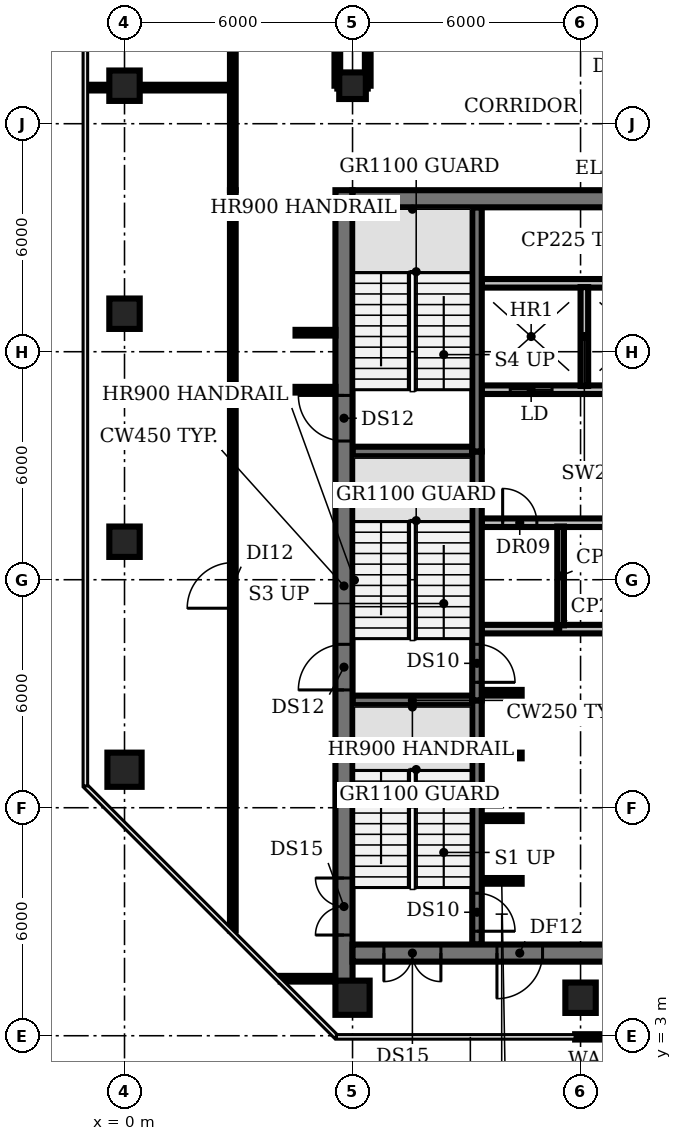
"""IFC4 building model, lengths in metres.
Left out: names, types, materials, properties, quantities, classifications, styles, units other than length and angle.
Written with IfcOpenShell. Run it as: python <this file> out.ifc"""

import sys

from ifc_helpers import new_model, si_unit, direction, frame, frame_2d, origin, origin_2d, place, context, subcontext, project, spatial, rectangle, circle, extrude, element, fill, save


model = new_model("IFC4")
c1 = context("Model", 3, precision=1e-05, world=origin(), true_north=direction((0.0, 1.0)))
c2 = subcontext(c1, "Body", "Model", "MODEL_VIEW")
j1 = project(units=[si_unit("LENGTHUNIT", "METRE"), si_unit("PLANEANGLEUNIT", "RADIAN")], contexts=[c1])
p1 = place(None, origin())
s1 = spatial("IfcSite", under=j1, at=p1, CompositionType="ELEMENT")
p2 = place(p1, origin())
s2 = spatial("IfcBuilding", under=s1, at=p2, CompositionType="ELEMENT")
p3 = place(p2, frame((0.0, 0.0, 213.8)))
s3 = spatial("IfcBuildingStorey", under=s2, at=p3, CompositionType="ELEMENT", Elevation=213.8)
p4 = place(p3, frame((0.0, 10.0, 0.0), z_axis=(0.0, 0.0, 1.0), x_axis=(1.0, 0.0, 0.0)))
e1 = element("IfcColumn", 1, at=p4, inside=s3, PredefinedType="COLUMN", context=c2, shape_type="SweptSolid", body=[
    extrude(circle(Radius=0.45, at=origin_2d()), origin(), (0.0, 0.0, 1.0), 3.85),
])
for number, where, z_axis, x_axis in (
    (2, (0.0, 16.0, 0.0), (0.0, 0.0, 1.0), (1.0, 0.0, 0.0)),
    (3, (0.0, 22.0, 0.0), (0.0, 0.0, 1.0), (1.0, 0.0, 0.0)),
    (4, (0.0, 28.0, 0.0), (0.0, 0.0, 1.0), (1.0, 0.0, 0.0)),
):
    element("IfcColumn", number, at=place(p3, frame(where, z_axis=z_axis, x_axis=x_axis)), inside=s3, PredefinedType="COLUMN", context=c2, shape_type="SweptSolid", body=[
        extrude(rectangle(XDim=0.8, YDim=0.8, at=origin_2d()), origin(), (0.0, 0.0, 1.0), 3.85),
    ])
p5 = place(p3, frame((6.0, 4.0, 0.0), z_axis=(0.0, 0.0, 1.0), x_axis=(1.0, 0.0, 0.0)))
e5 = element("IfcColumn", 5, at=p5, inside=s3, PredefinedType="COLUMN", context=c2, shape_type="SweptSolid", body=[
    extrude(circle(Radius=0.45, at=origin_2d()), origin(), (0.0, 0.0, 1.0), 3.85),
])
p6 = place(p3, frame((6.0, 28.0, 0.0), z_axis=(0.0, 0.0, 1.0), x_axis=(1.0, 0.0, 0.0)))
e6 = element("IfcColumn", 6, at=p6, inside=s3, PredefinedType="COLUMN", context=c2, shape_type="SweptSolid", body=[
    extrude(rectangle(XDim=0.7, YDim=0.7, at=origin_2d()), origin(), (0.0, 0.0, 1.0), 3.85),
])
p7 = place(p3, frame((12.0, 4.0, 0.0), z_axis=(0.0, 0.0, 1.0), x_axis=(1.0, 0.0, 0.0)))
e7 = element("IfcColumn", 7, at=p7, inside=s3, PredefinedType="COLUMN", context=c2, shape_type="SweptSolid", body=[
    extrude(rectangle(XDim=0.8, YDim=0.8, at=origin_2d()), origin(), (0.0, 0.0, 1.0), 3.85),
])
p8 = place(p3, frame((11.858, 2.97, 0.0), z_axis=(0.0, 0.0, 1.0), x_axis=(1.0, 0.0, 0.0)))
e8 = element("IfcWall", 8, at=p8, inside=s3, PredefinedType="SOLIDWALL", context=c2, shape_type="SweptSolid", body=[
    extrude(rectangle(XDim=6.284, YDim=0.14, at=frame_2d((3.142, 0.0))), origin(), (0.0, 0.0, 1.0), 3.85),
])
p9 = place(p8, frame((2.242, 0.0, 0.0)))
e9 = element("IfcOpeningElement", 9, at=p9, cuts=e8, PredefinedType="OPENING", context=c2, shape_type="SweptSolid", body=[
    extrude(rectangle(XDim=1.8, YDim=2.4, at=frame_2d((0.9, 1.2))), frame((0.0, 0.08, 0.0), z_axis=(0.0, -1.0, 0.0), x_axis=(1.0, 0.0, 0.0)), (0.0, 0.0, 1.0), 0.16),
])
for number, where, z_axis, x_axis in (
    (10, (9.4, 7.075, 0.0), (0.0, 0.0, 1.0), (1.0, 0.0, 0.0)),
    (11, (9.4, 8.725, 0.0), (0.0, 0.0, 1.0), (1.0, 0.0, 0.0)),
    (12, (9.4, 10.375, 0.0), (0.0, 0.0, 1.0), (1.0, 0.0, 0.0)),
):
    element("IfcWall", number, at=place(p3, frame(where, z_axis=z_axis, x_axis=x_axis)), inside=s3, PredefinedType="SHEAR", context=c2, shape_type="SweptSolid", body=[
        extrude(rectangle(XDim=1.05, YDim=0.15, at=frame_2d((0.525, 0.0))), origin(), (0.0, 0.0, 1.0), 3.85),
    ])
p10 = place(p3, frame((6.0, 11.825, 0.0), z_axis=(0.0, 0.0, 1.0), x_axis=(1.0, 0.0, 0.0)))
e13 = element("IfcWall", 13, at=p10, inside=s3, PredefinedType="SHEAR", context=c2, shape_type="SweptSolid", body=[
    extrude(rectangle(XDim=3.15, YDim=0.25, at=frame_2d((1.575, 0.0))), origin(), (0.0, 0.0, 1.0), 3.85),
])
p11 = place(p3, frame((9.4, 12.025, 0.0), z_axis=(0.0, 0.0, 1.0), x_axis=(1.0, 0.0, 0.0)))
e14 = element("IfcWall", 14, at=p11, inside=s3, PredefinedType="SHEAR", context=c2, shape_type="SweptSolid", body=[
    extrude(rectangle(XDim=1.05, YDim=0.15, at=frame_2d((0.525, 0.0))), origin(), (0.0, 0.0, 1.0), 3.85),
])
p12 = place(p3, frame((9.4, 13.7, 0.0), z_axis=(0.0, 0.0, 1.0), x_axis=(1.0, 0.0, 0.0)))
e15 = element("IfcWall", 15, at=p12, inside=s3, PredefinedType="PARTITIONING", context=c2, shape_type="SweptSolid", body=[
    extrude(rectangle(XDim=4.0, YDim=0.225, at=frame_2d((2.0, 0.0))), origin(), (0.0, 0.0, 1.0), 3.85),
])
p13 = place(p3, frame((9.4, 16.5, 0.0), z_axis=(0.0, 0.0, 1.0), x_axis=(1.0, 0.0, 0.0)))
e16 = element("IfcWall", 16, at=p13, inside=s3, PredefinedType="PARTITIONING", context=c2, shape_type="SweptSolid", body=[
    extrude(rectangle(XDim=14.6, YDim=0.225, at=frame_2d((7.3, 0.0))), origin(), (0.0, 0.0, 1.0), 3.85),
])
p14 = place(p13, frame((0.55, 0.0, 0.0)))
e17 = element("IfcOpeningElement", 17, at=p14, cuts=e16, PredefinedType="OPENING", context=c2, shape_type="SweptSolid", body=[
    extrude(rectangle(XDim=0.9, YDim=2.1, at=frame_2d((0.45, 1.05))), frame((0.0, 0.123, 0.0), z_axis=(0.0, -1.0, 0.0), x_axis=(1.0, 0.0, 0.0)), (0.0, 0.0, 1.0), 0.245),
])
p15 = place(p13, frame((6.075, 0.0, 0.0)))
e18 = element("IfcOpeningElement", 18, at=p15, cuts=e16, PredefinedType="OPENING", context=c2, shape_type="SweptSolid", body=[
    extrude(rectangle(XDim=1.0, YDim=2.1, at=frame_2d((0.5, 1.05))), frame((0.0, 0.123, 0.0), z_axis=(0.0, -1.0, 0.0), x_axis=(1.0, 0.0, 0.0)), (0.0, 0.0, 1.0), 0.245),
])
p16 = place(p13, frame((11.308, 0.0, 0.0)))
e19 = element("IfcOpeningElement", 19, at=p16, cuts=e16, PredefinedType="OPENING", context=c2, shape_type="SweptSolid", body=[
    extrude(rectangle(XDim=0.9, YDim=2.1, at=frame_2d((0.45, 1.05))), frame((0.0, 0.123, 0.0), z_axis=(0.0, -1.0, 0.0), x_axis=(1.0, 0.0, 0.0)), (0.0, 0.0, 1.0), 0.245),
])
p17 = place(p13, frame((13.083, 0.0, 0.0)))
e20 = element("IfcOpeningElement", 20, at=p17, cuts=e16, PredefinedType="OPENING", context=c2, shape_type="SweptSolid", body=[
    extrude(rectangle(XDim=0.9, YDim=2.1, at=frame_2d((0.45, 1.05))), frame((0.0, 0.123, 0.0), z_axis=(0.0, -1.0, 0.0), x_axis=(1.0, 0.0, 0.0)), (0.0, 0.0, 1.0), 0.245),
])
p18 = place(p3, frame((6.0, 18.375, 0.0), z_axis=(0.0, 0.0, 1.0), x_axis=(1.0, 0.0, 0.0)))
e21 = element("IfcWall", 21, at=p18, inside=s3, PredefinedType="SHEAR", context=c2, shape_type="SweptSolid", body=[
    extrude(rectangle(XDim=3.15, YDim=0.25, at=frame_2d((1.575, 0.0))), origin(), (0.0, 0.0, 1.0), 3.85),
])
p19 = place(p3, frame((24.0, 20.0, 0.0), z_axis=(0.0, 0.0, 1.0), x_axis=(-1.0, 0.0, 0.0)))
e22 = element("IfcWall", 22, at=p19, inside=s3, PredefinedType="PARTITIONING", context=c2, shape_type="SweptSolid", body=[
    extrude(rectangle(XDim=14.6, YDim=0.225, at=frame_2d((7.3, 0.0))), origin(), (0.0, 0.0, 1.0), 3.85),
])
p20 = place(p19, frame((12.75, 0.0, 0.0)))
e23 = element("IfcOpeningElement", 23, at=p20, cuts=e22, PredefinedType="OPENING", context=c2, shape_type="SweptSolid", body=[
    extrude(rectangle(XDim=1.1, YDim=2.1, at=frame_2d((0.55, 1.05))), frame((0.0, 0.123, 0.0), z_axis=(0.0, -1.0, 0.0), x_axis=(1.0, 0.0, 0.0)), (0.0, 0.0, 1.0), 0.245),
])
p21 = place(p19, frame((9.95, 0.0, 0.0)))
e24 = element("IfcOpeningElement", 24, at=p21, cuts=e22, PredefinedType="OPENING", context=c2, shape_type="SweptSolid", body=[
    extrude(rectangle(XDim=1.1, YDim=2.1, at=frame_2d((0.55, 1.05))), frame((0.0, 0.123, 0.0), z_axis=(0.0, -1.0, 0.0), x_axis=(1.0, 0.0, 0.0)), (0.0, 0.0, 1.0), 0.245),
])
p22 = place(p19, frame((7.15, 0.0, 0.0)))
e25 = element("IfcOpeningElement", 25, at=p22, cuts=e22, PredefinedType="OPENING", context=c2, shape_type="SweptSolid", body=[
    extrude(rectangle(XDim=1.1, YDim=2.1, at=frame_2d((0.55, 1.05))), frame((0.0, 0.123, 0.0), z_axis=(0.0, -1.0, 0.0), x_axis=(1.0, 0.0, 0.0)), (0.0, 0.0, 1.0), 0.245),
])
p23 = place(p19, frame((4.35, 0.0, 0.0)))
e26 = element("IfcOpeningElement", 26, at=p23, cuts=e22, PredefinedType="OPENING", context=c2, shape_type="SweptSolid", body=[
    extrude(rectangle(XDim=1.1, YDim=2.1, at=frame_2d((0.55, 1.05))), frame((0.0, 0.123, 0.0), z_axis=(0.0, -1.0, 0.0), x_axis=(1.0, 0.0, 0.0)), (0.0, 0.0, 1.0), 0.245),
])
p24 = place(p19, frame((2.308, 0.0, 0.0)))
e27 = element("IfcOpeningElement", 27, at=p24, cuts=e22, PredefinedType="OPENING", context=c2, shape_type="SweptSolid", body=[
    extrude(rectangle(XDim=0.9, YDim=2.1, at=frame_2d((0.45, 1.05))), frame((0.0, 0.123, 0.0), z_axis=(0.0, -1.0, 0.0), x_axis=(1.0, 0.0, 0.0)), (0.0, 0.0, 1.0), 0.245),
])
p25 = place(p19, frame((0.532, 0.0, 0.0)))
e28 = element("IfcOpeningElement", 28, at=p25, cuts=e22, PredefinedType="OPENING", context=c2, shape_type="SweptSolid", body=[
    extrude(rectangle(XDim=0.9, YDim=2.1, at=frame_2d((0.45, 1.05))), frame((0.0, 0.123, 0.0), z_axis=(0.0, -1.0, 0.0), x_axis=(1.0, 0.0, 0.0)), (0.0, 0.0, 1.0), 0.245),
])
p26 = place(p3, frame((9.4, 22.8, 0.0), z_axis=(0.0, 0.0, 1.0), x_axis=(1.0, 0.0, 0.0)))
e29 = element("IfcWall", 29, at=p26, inside=s3, PredefinedType="PARTITIONING", context=c2, shape_type="SweptSolid", body=[
    extrude(rectangle(XDim=14.6, YDim=0.225, at=frame_2d((7.3, 0.0))), origin(), (0.0, 0.0, 1.0), 3.85),
])
p27 = place(p3, frame((9.275, 11.825, 0.0), z_axis=(0.0, 0.0, 1.0), x_axis=(0.0, -1.0, 0.0)))
e30 = element("IfcWall", 30, at=p27, inside=s3, PredefinedType="SHEAR", context=c2, shape_type="SweptSolid", body=[
    extrude(rectangle(XDim=6.425, YDim=0.25, at=frame_2d((3.212, 0.0))), origin(), (0.0, 0.0, 1.0), 3.85),
])
p28 = place(p27, frame((5.075, 0.0, 0.0)))
e31 = element("IfcOpeningElement", 31, at=p28, cuts=e30, PredefinedType="OPENING", context=c2, shape_type="SweptSolid", body=[
    extrude(rectangle(XDim=1.0, YDim=2.1, at=frame_2d((0.5, 1.05))), frame((0.0, 0.135, 0.0), z_axis=(0.0, -1.0, 0.0), x_axis=(1.0, 0.0, 0.0)), (0.0, 0.0, 1.0), 0.27),
])
p29 = place(p3, frame((9.275, 18.375, 0.0), z_axis=(0.0, 0.0, 1.0), x_axis=(0.0, -1.0, 0.0)))
e32 = element("IfcWall", 32, at=p29, inside=s3, PredefinedType="SHEAR", context=c2, shape_type="SweptSolid", body=[
    extrude(rectangle(XDim=6.55, YDim=0.25, at=frame_2d((3.275, 0.0))), origin(), (0.0, 0.0, 1.0), 3.85),
])
p30 = place(p29, frame((5.075, 0.0, 0.0)))
e33 = element("IfcOpeningElement", 33, at=p30, cuts=e32, PredefinedType="OPENING", context=c2, shape_type="SweptSolid", body=[
    extrude(rectangle(XDim=1.0, YDim=2.1, at=frame_2d((0.5, 1.05))), frame((0.0, 0.135, 0.0), z_axis=(0.0, -1.0, 0.0), x_axis=(1.0, 0.0, 0.0)), (0.0, 0.0, 1.0), 0.27),
])
p31 = place(p3, frame((9.275, 18.375, 0.0), z_axis=(0.0, 0.0, 1.0), x_axis=(0.0, 1.0, 0.0)))
e34 = element("IfcWall", 34, at=p31, inside=s3, PredefinedType="SHEAR", context=c2, shape_type="SweptSolid", body=[
    extrude(rectangle(XDim=6.425, YDim=0.25, at=frame_2d((3.212, 0.0))), origin(), (0.0, 0.0, 1.0), 3.85),
])
p32 = place(p3, frame((11.475, 13.8, 0.0), z_axis=(0.0, 0.0, 1.0), x_axis=(0.0, 1.0, 0.0)))
e35 = element("IfcWall", 35, at=p32, inside=s3, PredefinedType="PARTITIONING", context=c2, shape_type="SweptSolid", body=[
    extrude(rectangle(XDim=2.6, YDim=0.175, at=frame_2d((1.3, 0.0))), origin(), (0.0, 0.0, 1.0), 3.85),
])
p33 = place(p3, frame((12.1, 20.1, 0.0), z_axis=(0.0, 0.0, 1.0), x_axis=(0.0, 1.0, 0.0)))
e36 = element("IfcWall", 36, at=p33, inside=s3, PredefinedType="SOLIDWALL", context=c2, shape_type="SweptSolid", body=[
    extrude(rectangle(XDim=2.6, YDim=0.2, at=frame_2d((1.3, 0.0))), origin(), (0.0, 0.0, 1.0), 3.85),
])
p34 = place(p3, frame((5.775, 4.42, 0.0), z_axis=(0.0, 0.0, 1.0), x_axis=(0.0, 1.0, 0.0)))
e37 = element("IfcWall", 37, at=p34, inside=s3, PredefinedType="SHEAR", context=c2, shape_type="SweptSolid", body=[
    extrude(rectangle(XDim=20.83, YDim=0.45, at=frame_2d((10.415, 0.0))), origin(), (0.0, 0.0, 1.0), 3.85),
])
p35 = place(p34, frame((1.23, 0.0, 0.0)))
e38 = element("IfcOpeningElement", 38, at=p35, cuts=e37, PredefinedType="OPENING", context=c2, shape_type="SweptSolid", body=[
    extrude(rectangle(XDim=1.5, YDim=2.1, at=frame_2d((0.75, 1.05))), frame((0.0, 0.235, 0.0), z_axis=(0.0, -1.0, 0.0), x_axis=(1.0, 0.0, 0.0)), (0.0, 0.0, 1.0), 0.47),
])
p36 = place(p34, frame((7.68, 0.0, 0.0)))
e39 = element("IfcOpeningElement", 39, at=p36, cuts=e37, PredefinedType="OPENING", context=c2, shape_type="SweptSolid", body=[
    extrude(rectangle(XDim=1.2, YDim=2.1, at=frame_2d((0.6, 1.05))), frame((0.0, 0.235, 0.0), z_axis=(0.0, -1.0, 0.0), x_axis=(1.0, 0.0, 0.0)), (0.0, 0.0, 1.0), 0.47),
])
p37 = place(p34, frame((14.23, 0.0, 0.0)))
e40 = element("IfcOpeningElement", 40, at=p37, cuts=e37, PredefinedType="OPENING", context=c2, shape_type="SweptSolid", body=[
    extrude(rectangle(XDim=1.2, YDim=2.1, at=frame_2d((0.6, 1.05))), frame((0.0, 0.235, 0.0), z_axis=(0.0, -1.0, 0.0), x_axis=(1.0, 0.0, 0.0)), (0.0, 0.0, 1.0), 0.47),
])
p38 = place(p3, frame((24.0, 5.175, 0.0), z_axis=(0.0, 0.0, 1.0), x_axis=(-1.0, 0.0, 0.0)))
e41 = element("IfcWall", 41, at=p38, inside=s3, PredefinedType="SHEAR", context=c2, shape_type="SweptSolid", body=[
    extrude(rectangle(XDim=18.0, YDim=0.45, at=frame_2d((9.0, 0.0))), origin(), (0.0, 0.0, 1.0), 3.85),
])
p39 = place(p38, frame((0.825, 0.0, 0.0)))
e42 = element("IfcOpeningElement", 42, at=p39, cuts=e41, PredefinedType="OPENING", context=c2, shape_type="SweptSolid", body=[
    extrude(rectangle(XDim=1.5, YDim=2.1, at=frame_2d((0.75, 1.05))), frame((0.0, 0.235, 0.0), z_axis=(0.0, -1.0, 0.0), x_axis=(1.0, 0.0, 0.0)), (0.0, 0.0, 1.0), 0.47),
])
p40 = place(p38, frame((15.675, 0.0, 0.0)))
e43 = element("IfcOpeningElement", 43, at=p40, cuts=e41, PredefinedType="OPENING", context=c2, shape_type="SweptSolid", body=[
    extrude(rectangle(XDim=1.5, YDim=2.1, at=frame_2d((0.75, 1.05))), frame((0.0, 0.235, 0.0), z_axis=(0.0, -1.0, 0.0), x_axis=(1.0, 0.0, 0.0)), (0.0, 0.0, 1.0), 0.47),
])
p41 = place(p38, frame((13.0, 0.0, 0.0)))
e44 = element("IfcOpeningElement", 44, at=p41, cuts=e41, PredefinedType="OPENING", context=c2, shape_type="SweptSolid", body=[
    extrude(rectangle(XDim=1.2, YDim=2.1, at=frame_2d((0.6, 1.05))), frame((0.0, 0.235, 0.0), z_axis=(0.0, -1.0, 0.0), x_axis=(1.0, 0.0, 0.0)), (0.0, 0.0, 1.0), 0.47),
])
p42 = place(p38, frame((4.4, 0.0, 0.0)))
e45 = element("IfcOpeningElement", 45, at=p42, cuts=e41, PredefinedType="OPENING", context=c2, shape_type="SweptSolid", body=[
    extrude(rectangle(XDim=1.0, YDim=2.1, at=frame_2d((0.5, 1.05))), frame((0.0, 0.235, 0.0), z_axis=(0.0, -1.0, 0.0), x_axis=(1.0, 0.0, 0.0)), (0.0, 0.0, 1.0), 0.47),
])
p43 = place(p3, frame((6.0, 25.025, 0.0), z_axis=(0.0, 0.0, 1.0), x_axis=(1.0, 0.0, 0.0)))
e46 = element("IfcWall", 46, at=p43, inside=s3, PredefinedType="SHEAR", context=c2, shape_type="SweptSolid", body=[
    extrude(rectangle(XDim=18.0, YDim=0.45, at=frame_2d((9.0, 0.0))), origin(), (0.0, 0.0, 1.0), 3.85),
])
p44 = place(p3, frame((-0.965, 27.95, 0.0), z_axis=(0.0, 0.0, 1.0), x_axis=(1.0, 0.0, 0.0)))
e47 = element("IfcWall", 47, at=p44, inside=s3, PredefinedType="PARTITIONING", context=c2, shape_type="SweptSolid", body=[
    extrude(rectangle(XDim=3.815, YDim=0.15, at=frame_2d((1.908, 0.0))), origin(), (0.0, 0.0, 1.0), 2.88),
])
p45 = place(p3, frame((2.85, 5.77, 0.0), z_axis=(0.0, 0.0, 1.0), x_axis=(0.0, 1.0, 0.0)))
e48 = element("IfcWall", 48, at=p45, inside=s3, PredefinedType="PARTITIONING", context=c2, shape_type="SweptSolid", body=[
    extrude(rectangle(XDim=19.48, YDim=0.15, at=frame_2d((9.74, 0.0))), origin(), (0.0, 0.0, 1.0), 2.88),
])
p46 = place(p45, frame((8.48, 0.0, 0.0)))
e49 = element("IfcOpeningElement", 49, at=p46, cuts=e48, PredefinedType="OPENING", context=c2, shape_type="SweptSolid", body=[
    extrude(rectangle(XDim=1.2, YDim=2.1, at=frame_2d((0.6, 1.05))), frame((0.0, 0.085, 0.0), z_axis=(0.0, -1.0, 0.0), x_axis=(1.0, 0.0, 0.0)), (0.0, 0.0, 1.0), 0.17),
])
p47 = place(p3, frame((2.85, 25.25, 0.0), z_axis=(0.0, 0.0, 1.0), x_axis=(0.0, 1.0, 0.0)))
e50 = element("IfcWall", 50, at=p47, inside=s3, PredefinedType="PARTITIONING", context=c2, shape_type="SweptSolid", body=[
    extrude(rectangle(XDim=3.9, YDim=0.15, at=frame_2d((1.95, 0.0))), origin(), (0.0, 0.0, 1.0), 2.88),
])
p48 = place(p3, frame((4.11, 4.5, 0.0), z_axis=(0.0, 0.0, 1.0), x_axis=(1.0, 0.0, 0.0)))
e51 = element("IfcWall", 51, at=p48, inside=s3, PredefinedType="PARTITIONING", context=c2, shape_type="SweptSolid", body=[
    extrude(rectangle(XDim=1.34, YDim=0.15, at=frame_2d((0.67, 0.0))), origin(), (0.0, 0.0, 1.0), 2.88),
])
for number, where, z_axis, x_axis in (
    (52, (4.5, 20.0, 0.0), (0.0, 0.0, 1.0), (1.0, 0.0, 0.0)),
    (53, (4.5, 21.5, 0.0), (0.0, 0.0, 1.0), (1.0, 0.0, 0.0)),
):
    element("IfcWall", number, at=place(p3, frame(where, z_axis=z_axis, x_axis=x_axis)), inside=s3, PredefinedType="PARTITIONING", context=c2, shape_type="SweptSolid", body=[
        extrude(rectangle(XDim=1.05, YDim=0.15, at=frame_2d((0.525, 0.0))), origin(), (0.0, 0.0, 1.0), 2.88),
    ])
p49 = place(p3, frame((5.6, 28.0, 0.0), z_axis=(0.0, 0.0, 1.0), x_axis=(0.0, 1.0, 0.0)))
e54 = element("IfcWall", 54, at=p49, inside=s3, PredefinedType="PARTITIONING", context=c2, shape_type="SweptSolid", body=[
    extrude(rectangle(XDim=1.15, YDim=0.15, at=frame_2d((0.575, 0.0))), origin(), (0.0, 0.0, 1.0), 2.88),
])
p50 = place(p3, frame((5.6, 28.0, 0.0), z_axis=(0.0, 0.0, 1.0), x_axis=(1.0, 0.0, 0.0)))
e55 = element("IfcWall", 55, at=p50, inside=s3, PredefinedType="PARTITIONING", context=c2, shape_type="SweptSolid", body=[
    extrude(rectangle(XDim=0.8, YDim=0.15, at=frame_2d((0.4, 0.0))), origin(), (0.0, 0.0, 1.0), 2.88),
])
p51 = place(p3, frame((6.4, 28.0, 0.0), z_axis=(0.0, 0.0, 1.0), x_axis=(0.0, 1.0, 0.0)))
e56 = element("IfcWall", 56, at=p51, inside=s3, PredefinedType="PARTITIONING", context=c2, shape_type="SweptSolid", body=[
    extrude(rectangle(XDim=1.15, YDim=0.15, at=frame_2d((0.575, 0.0))), origin(), (0.0, 0.0, 1.0), 2.88),
])
p52 = place(p14, origin())
e57 = element("IfcDoor", 57, at=p52, inside=s3, OperationType="SINGLE_SWING_LEFT", PredefinedType="DOOR", context=c2, shape_type="SweptSolid", body=[
    extrude(rectangle(XDim=0.9, YDim=2.1, at=frame_2d((0.45, 1.05))), frame((0.0, 0.025, 0.0), z_axis=(0.0, -1.0, 0.0), x_axis=(1.0, 0.0, 0.0)), (0.0, 0.0, 1.0), 0.05),
])
fill(e17, e57)
p53 = place(p20, origin())
e58 = element("IfcDoor", 58, at=p53, inside=s3, OperationType="DOUBLE_DOOR_SLIDING", PredefinedType="DOOR", context=c2, shape_type="SweptSolid", body=[
    extrude(rectangle(XDim=1.1, YDim=2.1, at=frame_2d((0.55, 1.05))), frame((0.0, 0.025, 0.0), z_axis=(0.0, -1.0, 0.0), x_axis=(1.0, 0.0, 0.0)), (0.0, 0.0, 1.0), 0.05),
])
fill(e23, e58)
p54 = place(p28, origin())
e59 = element("IfcDoor", 59, at=p54, inside=s3, OperationType="SINGLE_SWING_RIGHT", PredefinedType="DOOR", context=c2, shape_type="SweptSolid", body=[
    extrude(rectangle(XDim=1.0, YDim=2.1, at=frame_2d((0.5, 1.05))), frame((0.0, 0.025, 0.0), z_axis=(0.0, -1.0, 0.0), x_axis=(1.0, 0.0, 0.0)), (0.0, 0.0, 1.0), 0.05),
])
fill(e31, e59)
p55 = place(p30, origin())
e60 = element("IfcDoor", 60, at=p55, inside=s3, OperationType="SINGLE_SWING_RIGHT", PredefinedType="DOOR", context=c2, shape_type="SweptSolid", body=[
    extrude(rectangle(XDim=1.0, YDim=2.1, at=frame_2d((0.5, 1.05))), frame((0.0, 0.025, 0.0), z_axis=(0.0, -1.0, 0.0), x_axis=(1.0, 0.0, 0.0)), (0.0, 0.0, 1.0), 0.05),
])
fill(e33, e60)
p56 = place(p35, origin())
e61 = element("IfcDoor", 61, at=p56, inside=s3, OperationType="DOUBLE_DOOR_SINGLE_SWING", PredefinedType="DOOR", context=c2, shape_type="SweptSolid", body=[
    extrude(rectangle(XDim=1.5, YDim=2.1, at=frame_2d((0.75, 1.05))), frame((0.0, 0.025, 0.0), z_axis=(0.0, -1.0, 0.0), x_axis=(1.0, 0.0, 0.0)), (0.0, 0.0, 1.0), 0.05),
])
fill(e38, e61)
p57 = place(p36, origin())
e62 = element("IfcDoor", 62, at=p57, inside=s3, OperationType="SINGLE_SWING_LEFT", PredefinedType="DOOR", context=c2, shape_type="SweptSolid", body=[
    extrude(rectangle(XDim=1.2, YDim=2.1, at=frame_2d((0.6, 1.05))), frame((0.0, 0.025, 0.0), z_axis=(0.0, -1.0, 0.0), x_axis=(1.0, 0.0, 0.0)), (0.0, 0.0, 1.0), 0.05),
])
fill(e39, e62)
p58 = place(p37, origin())
e63 = element("IfcDoor", 63, at=p58, inside=s3, OperationType="SINGLE_SWING_RIGHT", PredefinedType="DOOR", context=c2, shape_type="SweptSolid", body=[
    extrude(rectangle(XDim=1.2, YDim=2.1, at=frame_2d((0.6, 1.05))), frame((0.0, 0.025, 0.0), z_axis=(0.0, -1.0, 0.0), x_axis=(1.0, 0.0, 0.0)), (0.0, 0.0, 1.0), 0.05),
])
fill(e40, e63)
p59 = place(p40, origin())
e64 = element("IfcDoor", 64, at=p59, inside=s3, OperationType="DOUBLE_DOOR_SINGLE_SWING", PredefinedType="DOOR", context=c2, shape_type="SweptSolid", body=[
    extrude(rectangle(XDim=1.5, YDim=2.1, at=frame_2d((0.75, 1.05))), frame((0.0, 0.025, 0.0), z_axis=(0.0, -1.0, 0.0), x_axis=(1.0, 0.0, 0.0)), (0.0, 0.0, 1.0), 0.05),
])
fill(e43, e64)
p60 = place(p41, origin())
e65 = element("IfcDoor", 65, at=p60, inside=s3, OperationType="SINGLE_SWING_RIGHT", PredefinedType="DOOR", context=c2, shape_type="SweptSolid", body=[
    extrude(rectangle(XDim=1.2, YDim=2.1, at=frame_2d((0.6, 1.05))), frame((0.0, 0.025, 0.0), z_axis=(0.0, -1.0, 0.0), x_axis=(1.0, 0.0, 0.0)), (0.0, 0.0, 1.0), 0.05),
])
fill(e44, e65)
p61 = place(p46, origin())
e66 = element("IfcDoor", 66, at=p61, inside=s3, OperationType="SINGLE_SWING_LEFT", PredefinedType="DOOR", context=c2, shape_type="SweptSolid", body=[
    extrude(rectangle(XDim=1.2, YDim=2.1, at=frame_2d((0.6, 1.05))), frame((0.0, 0.025, 0.0), z_axis=(0.0, -1.0, 0.0), x_axis=(1.0, 0.0, 0.0)), (0.0, 0.0, 1.0), 0.05),
])
fill(e49, e66)
save(model, sys.argv[1])
